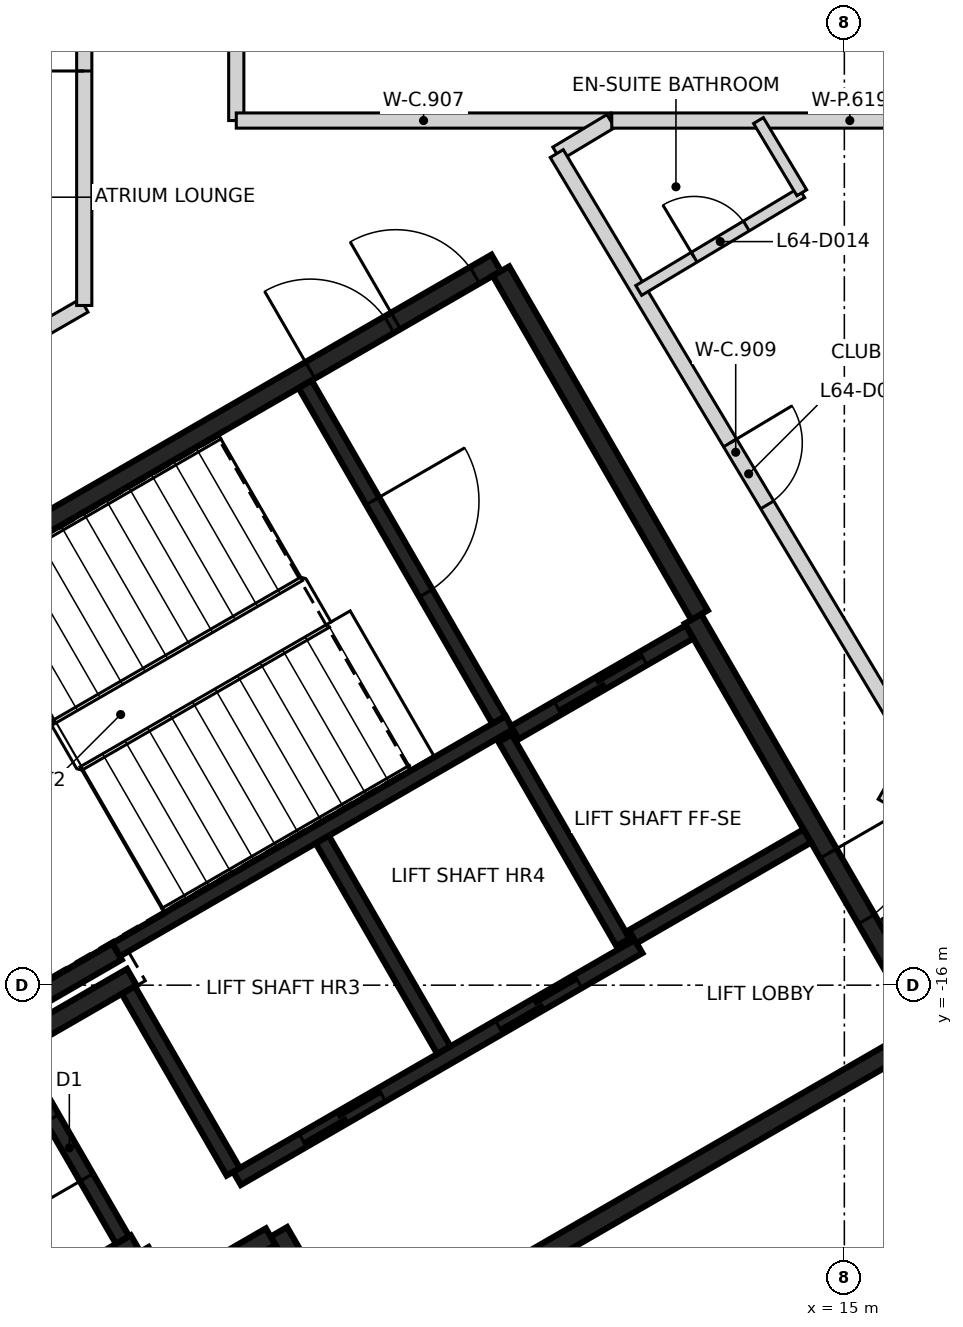
"""IFC4 building model, lengths in metres.
Left out: names, types, materials, properties, quantities, classifications, styles, units other than length and angle.
Written with IfcOpenShell. Run it as: python <this file> out.ifc"""

import sys

from ifc_helpers import new_model, si_unit, direction, frame, frame_2d, origin, place, context, subcontext, project, spatial, rectangle, extrude, element, fill, save


model = new_model("IFC4")
c1 = context("Model", 3, precision=1e-05, world=origin(), true_north=direction((0.0, 1.0)))
c2 = subcontext(c1, "Body", "Model", "MODEL_VIEW")
j1 = project(units=[si_unit("LENGTHUNIT", "METRE"), si_unit("PLANEANGLEUNIT", "RADIAN")], contexts=[c1])
p1 = place(None, origin())
s1 = spatial("IfcSite", under=j1, at=p1, CompositionType="ELEMENT")
p2 = place(p1, origin())
s2 = spatial("IfcBuilding", under=s1, at=p2, CompositionType="ELEMENT")
p3 = place(p2, frame((0.0, 0.0, 253.8)))
s3 = spatial("IfcBuildingStorey", under=s2, at=p3, CompositionType="ELEMENT", Elevation=253.8)
p4 = place(p3, frame((0.417, -12.273, 0.0), z_axis=(0.0, 0.0, 1.0), x_axis=(0.866021906294, 0.500006057782, 0.0)))
e1 = element("IfcWall", 1, at=p4, inside=s3, PredefinedType="SHEAR", context=c2, shape_type="SweptSolid", body=[
    extrude(rectangle(XDim=11.55, YDim=0.25, at=frame_2d((5.775, 0.0))), origin(), (0.0, 0.0, 1.0), 3.2),
])
p5 = place(p4, frame((10.025, 0.0, 0.0)))
e2 = element("IfcOpeningElement", 2, at=p5, cuts=e1, PredefinedType="OPENING", context=c2, shape_type="SweptSolid", body=[
    extrude(rectangle(XDim=1.2, YDim=2.1, at=frame_2d((0.6, 1.05))), frame((0.0, 0.135, 0.0), z_axis=(0.0, -1.0, 0.0), x_axis=(1.0, 0.0, 0.0)), (0.0, 0.0, 1.0), 0.27),
])
p6 = place(p4, frame((8.725, 0.0, 0.0)))
e3 = element("IfcOpeningElement", 3, at=p6, cuts=e1, PredefinedType="OPENING", context=c2, shape_type="SweptSolid", body=[
    extrude(rectangle(XDim=1.2, YDim=2.1, at=frame_2d((0.6, 1.05))), frame((0.0, 0.135, 0.0), z_axis=(0.0, -1.0, 0.0), x_axis=(1.0, 0.0, 0.0)), (0.0, 0.0, 1.0), 0.27),
])
p7 = place(p3, frame((16.133, -16.594, 0.0), z_axis=(0.0, 0.0, 1.0), x_axis=(-0.866022959057, -0.500004234368, 0.0)))
e4 = element("IfcWall", 4, at=p7, inside=s3, PredefinedType="SHEAR", context=c2, shape_type="SweptSolid", body=[
    extrude(rectangle(XDim=8.75, YDim=0.25, at=frame_2d((4.375, 0.0))), origin(), (0.0, 0.0, 1.0), 3.2),
])
p8 = place(p3, frame((13.008, -11.181, 0.0), z_axis=(0.0, 0.0, 1.0), x_axis=(0.500001955336, -0.866024274868, 0.0)))
e5 = element("IfcWall", 5, at=p8, inside=s3, PredefinedType="SHEAR", context=c2, shape_type="SweptSolid", body=[
    extrude(rectangle(XDim=6.125, YDim=0.25, at=frame_2d((3.062, 0.0))), origin(), (0.0, 0.0, 1.0), 3.2),
])
p9 = place(p8, frame((3.563, 0.0, 0.0)))
e6 = element("IfcOpeningElement", 6, at=p9, cuts=e5, PredefinedType="OPENING", context=c2, shape_type="SweptSolid", body=[
    extrude(rectangle(XDim=1.0, YDim=2.1, at=frame_2d((0.5, 1.05))), frame((0.0, 0.135, 0.0), z_axis=(0.0, -1.0, 0.0), x_axis=(1.0, 0.0, 0.0)), (0.0, 0.0, 1.0), 0.27),
])
p10 = place(p3, frame((10.483, -6.606, 0.0), z_axis=(0.0, 0.0, 1.0), x_axis=(0.49999885962, -0.866026062182, 0.0)))
e7 = element("IfcWall", 7, at=p10, inside=s3, PredefinedType="SHEAR", context=c2, shape_type="SweptSolid", body=[
    extrude(rectangle(XDim=5.225, YDim=0.25, at=frame_2d((2.612, 0.0))), origin(), (0.0, 0.0, 1.0), 3.2),
])
p11 = place(p3, frame((5.675, -19.399, 0.0), z_axis=(0.0, 0.0, 1.0), x_axis=(-0.866026637627, -0.499997862916, 0.0)))
e8 = element("IfcWall", 8, at=p11, inside=s3, PredefinedType="SHEAR", context=c2, shape_type="SweptSolid", body=[
    extrude(rectangle(XDim=2.865, YDim=0.25, at=frame_2d((1.432, 0.0))), origin(), (0.0, 0.0, 1.0), 3.2),
])
p12 = place(p3, frame((5.431, -15.556, 0.0), z_axis=(0.0, 0.0, 1.0), x_axis=(-0.866022940537, -0.500004266446, 0.0)))
e9 = element("IfcWall", 9, at=p12, inside=s3, PredefinedType="SHEAR", context=c2, shape_type="SweptSolid", body=[
    extrude(rectangle(XDim=2.575, YDim=0.25, at=frame_2d((1.287, 0.0))), origin(), (0.0, 0.0, 1.0), 3.2),
])
p13 = place(p3, frame((8.493, -20.86, 0.0), z_axis=(0.0, 0.0, 1.0), x_axis=(-0.500039802285, 0.866002422705, 0.0)))
e10 = element("IfcWall", 10, at=p13, inside=s3, PredefinedType="SHEAR", context=c2, shape_type="SweptSolid", body=[
    extrude(rectangle(XDim=1.865, YDim=0.25, at=frame_2d((0.932, 0.0))), origin(), (0.0, 0.0, 1.0), 3.2),
])
p14 = place(p3, frame((4.145, -16.749, 0.0), z_axis=(0.0, 0.0, 1.0), x_axis=(0.866038183914, 0.499977863513, 0.0)))
e11 = element("IfcWall", 11, at=p14, inside=s3, PredefinedType="SHEAR", context=c2, shape_type="SweptSolid", body=[
    extrude(rectangle(XDim=1.71, YDim=0.25, at=frame_2d((0.855, 0.0))), origin(), (0.0, 0.0, 1.0), 3.2),
])
p15 = place(p3, frame((7.452, -19.308, 0.0), z_axis=(0.0, 0.0, 1.0), x_axis=(-0.866044474677, -0.49996696679, 0.0)))
e12 = element("IfcWall", 12, at=p15, inside=s3, PredefinedType="SHEAR", context=c2, shape_type="SweptSolid", body=[
    extrude(rectangle(XDim=1.584, YDim=0.25, at=frame_2d((0.792, 0.0))), origin(), (0.0, 0.0, 1.0), 3.2),
])
p16 = place(p3, frame((6.017, -19.992, 0.0), z_axis=(0.0, 0.0, 1.0), x_axis=(-0.500364886717, 0.865814633822, 0.0)))
e13 = element("IfcWall", 13, at=p16, inside=s3, PredefinedType="SHEAR", context=c2, shape_type="SweptSolid", body=[
    extrude(rectangle(XDim=0.559, YDim=0.25, at=frame_2d((0.28, 0.0))), origin(), (0.0, 0.0, 1.0), 3.2),
])
p17 = place(p3, frame((5.419, -15.534, 0.0), z_axis=(0.0, 0.0, 1.0), x_axis=(0.866029065029, 0.499993658486, 0.0)))
e14 = element("IfcWall", 14, at=p17, inside=s3, PredefinedType="SHEAR", context=c2, shape_type="SweptSolid", body=[
    extrude(rectangle(XDim=5.974, YDim=0.2, at=frame_2d((2.987, 0.0))), origin(), (0.0, 0.0, 1.0), 3.2),
])
p18 = place(p3, frame((7.01, -18.542, 0.0), z_axis=(0.0, 0.0, 1.0), x_axis=(0.866030299012, 0.499991521122, 0.0)))
e15 = element("IfcWall", 15, at=p18, inside=s3, PredefinedType="SHEAR", context=c2, shape_type="SweptSolid", body=[
    extrude(rectangle(XDim=6.1, YDim=0.2, at=frame_2d((3.05, 0.0))), origin(), (0.0, 0.0, 1.0), 3.2),
])
p19 = place(p18, frame((1.0, 0.0, 0.0)))
e16 = element("IfcOpeningElement", 16, at=p19, cuts=e15, PredefinedType="OPENING", context=c2, shape_type="SweptSolid", body=[
    extrude(rectangle(XDim=1.2, YDim=2.1, at=frame_2d((0.6, 1.05))), frame((0.0, 0.11, 0.0), z_axis=(0.0, -1.0, 0.0), x_axis=(1.0, 0.0, 0.0)), (0.0, 0.0, 1.0), 0.22),
])
p20 = place(p18, frame((3.982, 0.0, 0.0)))
e17 = element("IfcOpeningElement", 17, at=p20, cuts=e15, PredefinedType="OPENING", context=c2, shape_type="SweptSolid", body=[
    extrude(rectangle(XDim=1.2, YDim=2.1, at=frame_2d((0.6, 1.05))), frame((0.0, 0.11, 0.0), z_axis=(0.0, -1.0, 0.0), x_axis=(1.0, 0.0, 0.0)), (0.0, 0.0, 1.0), 0.22),
])
p21 = place(p3, frame((7.906, -8.094, 0.0), z_axis=(0.0, 0.0, 1.0), x_axis=(0.500027839223, -0.866009330205, 0.0)))
e18 = element("IfcWall", 18, at=p21, inside=s3, PredefinedType="SHEAR", context=c2, shape_type="SweptSolid", body=[
    extrude(rectangle(XDim=5.098, YDim=0.2, at=frame_2d((2.549, 0.0))), origin(), (0.0, 0.0, 1.0), 3.2),
])
p22 = place(p21, frame((1.774, 0.0, 0.0)))
e19 = element("IfcOpeningElement", 19, at=p22, cuts=e18, PredefinedType="OPENING", context=c2, shape_type="SweptSolid", body=[
    extrude(rectangle(XDim=1.4, YDim=2.1, at=frame_2d((0.7, 1.05))), frame((0.0, 0.11, 0.0), z_axis=(0.0, -1.0, 0.0), x_axis=(1.0, 0.0, 0.0)), (0.0, 0.0, 1.0), 0.22),
])
p23 = place(p3, frame((8.132, -14.084, 0.0), z_axis=(0.0, 0.0, 1.0), x_axis=(0.499997778408, -0.866026686418, 0.0)))
e20 = element("IfcWall", 20, at=p23, inside=s3, PredefinedType="SHEAR", context=c2, shape_type="SweptSolid", body=[
    extrude(rectangle(XDim=3.198, YDim=0.2, at=frame_2d((1.599, 0.0))), origin(), (0.0, 0.0, 1.0), 3.2),
])
p24 = place(p3, frame((5.503, -19.352, 0.0), z_axis=(0.0, 0.0, 1.0), x_axis=(-0.499986818241, 0.866033014143, 0.0)))
e21 = element("IfcWall", 21, at=p24, inside=s3, PredefinedType="SHEAR", context=c2, shape_type="SweptSolid", body=[
    extrude(rectangle(XDim=2.798, YDim=0.2, at=frame_2d((1.399, 0.0))), origin(), (0.0, 0.0, 1.0), 3.2),
])
p25 = place(p24, frame((0.949, 0.0, 0.0)))
e22 = element("IfcOpeningElement", 22, at=p25, cuts=e21, PredefinedType="OPENING", context=c2, shape_type="SweptSolid", body=[
    extrude(rectangle(XDim=0.9, YDim=2.1, at=frame_2d((0.45, 1.05))), frame((0.0, 0.11, 0.0), z_axis=(0.0, -1.0, 0.0), x_axis=(1.0, 0.0, 0.0)), (0.0, 0.0, 1.0), 0.22),
])
p26 = place(p3, frame((6.96, -18.455, 0.0), z_axis=(0.0, 0.0, 1.0), x_axis=(-0.499926705758, 0.866067716099, 0.0)))
e23 = element("IfcWall", 23, at=p26, inside=s3, PredefinedType="SHEAR", context=c2, shape_type="SweptSolid", body=[
    extrude(rectangle(XDim=2.759, YDim=0.2, at=frame_2d((1.38, 0.0))), origin(), (0.0, 0.0, 1.0), 3.2),
])
p27 = place(p3, frame((12.088, -15.437, 0.0), z_axis=(0.0, 0.0, 1.0), x_axis=(-0.500026960575, 0.86600983753, 0.0)))
e24 = element("IfcWall", 24, at=p27, inside=s3, PredefinedType="SHEAR", context=c2, shape_type="SweptSolid", body=[
    extrude(rectangle(XDim=3.1, YDim=0.2, at=frame_2d((1.55, 0.0))), origin(), (0.0, 0.0, 1.0), 3.2),
])
p28 = place(p3, frame((10.666, -12.678, 0.0), z_axis=(0.0, 0.0, 1.0), x_axis=(0.866018407898, 0.500012117035, 0.0)))
e25 = element("IfcWall", 25, at=p28, inside=s3, PredefinedType="SHEAR", context=c2, shape_type="SweptSolid", body=[
    extrude(rectangle(XDim=2.651, YDim=0.2, at=frame_2d((1.325, 0.0))), origin(), (0.0, 0.0, 1.0), 3.2),
])
p29 = place(p28, frame((0.652, 0.0, 0.0)))
e26 = element("IfcOpeningElement", 26, at=p29, cuts=e25, PredefinedType="OPENING", context=c2, shape_type="SweptSolid", body=[
    extrude(rectangle(XDim=1.3, YDim=2.1, at=frame_2d((0.65, 1.05))), frame((0.0, 0.11, 0.0), z_axis=(0.0, -1.0, 0.0), x_axis=(1.0, 0.0, 0.0)), (0.0, 0.0, 1.0), 0.22),
])
p30 = place(p3, frame((14.512, -14.037, 0.0), z_axis=(0.0, 0.0, 1.0), x_axis=(-0.866018407898, -0.500012117035, 0.0)))
e27 = element("IfcWall", 27, at=p30, inside=s3, PredefinedType="SHEAR", context=c2, shape_type="SweptSolid", body=[
    extrude(rectangle(XDim=2.651, YDim=0.2, at=frame_2d((1.325, 0.0))), origin(), (0.0, 0.0, 1.0), 3.2),
])
p31 = place(p3, frame((3.612, -7.859, 0.0), z_axis=(0.0, 0.0, 1.0), x_axis=(0.866002901518, 0.500038973044, 0.0)))
e28 = element("IfcWall", 28, at=p31, inside=s3, PredefinedType="PARTITIONING", context=c2, shape_type="SweptSolid", body=[
    extrude(rectangle(XDim=1.602, YDim=0.2, at=frame_2d((0.801, 0.0))), origin(), (0.0, 0.0, 1.0), 3.2),
])
p32 = place(p3, frame((5.0, -7.058, 0.0), z_axis=(0.0, 0.0, 1.0), x_axis=(0.0, 1.0, 0.0)))
e29 = element("IfcWall", 29, at=p32, inside=s3, PredefinedType="PARTITIONING", context=c2, shape_type="SweptSolid", body=[
    extrude(rectangle(XDim=14.116, YDim=0.2, at=frame_2d((7.058, 0.0))), origin(), (0.0, 0.0, 1.0), 3.2),
])
p33 = place(p32, frame((3.085, 0.0, 0.0)))
e30 = element("IfcOpeningElement", 30, at=p33, cuts=e29, PredefinedType="OPENING", context=c2, shape_type="SweptSolid", body=[
    extrude(rectangle(XDim=0.9, YDim=2.1, at=frame_2d((0.45, 1.05))), frame((0.0, 0.11, 0.0), z_axis=(0.0, -1.0, 0.0), x_axis=(1.0, 0.0, 0.0)), (0.0, 0.0, 1.0), 0.22),
])
p34 = place(p32, frame((10.131, 0.0, 0.0)))
e31 = element("IfcOpeningElement", 31, at=p34, cuts=e29, PredefinedType="OPENING", context=c2, shape_type="SweptSolid", body=[
    extrude(rectangle(XDim=0.9, YDim=2.1, at=frame_2d((0.45, 1.05))), frame((0.0, 0.11, 0.0), z_axis=(0.0, -1.0, 0.0), x_axis=(1.0, 0.0, 0.0)), (0.0, 0.0, 1.0), 0.22),
])
p35 = place(p3, frame((7.0, -4.625, 0.0), z_axis=(0.0, 0.0, 1.0), x_axis=(0.0, 1.0, 0.0)))
e32 = element("IfcWall", 32, at=p35, inside=s3, PredefinedType="PARTITIONING", context=c2, shape_type="SweptSolid", body=[
    extrude(rectangle(XDim=12.884, YDim=0.2, at=frame_2d((6.442, 0.0))), origin(), (0.0, 0.0, 1.0), 3.2),
])
p36 = place(p35, frame((3.931, 0.0, 0.0)))
e33 = element("IfcOpeningElement", 33, at=p36, cuts=e32, PredefinedType="OPENING", context=c2, shape_type="SweptSolid", body=[
    extrude(rectangle(XDim=1.4, YDim=2.1, at=frame_2d((0.7, 1.05))), frame((0.0, 0.11, 0.0), z_axis=(0.0, -1.0, 0.0), x_axis=(1.0, 0.0, 0.0)), (0.0, 0.0, 1.0), 0.22),
])
p37 = place(p35, frame((11.777, 0.0, 0.0)))
e34 = element("IfcOpeningElement", 34, at=p37, cuts=e32, PredefinedType="OPENING", context=c2, shape_type="SweptSolid", body=[
    extrude(rectangle(XDim=0.95, YDim=2.1, at=frame_2d((0.475, 1.05))), frame((0.0, 0.11, 0.0), z_axis=(0.0, -1.0, 0.0), x_axis=(1.0, 0.0, 0.0)), (0.0, 0.0, 1.0), 0.22),
])
p38 = place(p3, frame((7.0, -4.625, 0.0), z_axis=(0.0, 0.0, 1.0), x_axis=(1.0, 0.0, 0.0)))
e35 = element("IfcWall", 35, at=p38, inside=s3, PredefinedType="PARTITIONING", context=c2, shape_type="SweptSolid", body=[
    extrude(rectangle(XDim=4.928, YDim=0.2, at=frame_2d((2.464, 0.0))), origin(), (0.0, 0.0, 1.0), 3.2),
])
p39 = place(p3, frame((11.216, -5.06, 0.0), z_axis=(0.0, 0.0, 1.0), x_axis=(0.857051740658, 0.515230350265, 0.0)))
e36 = element("IfcWall", 36, at=p39, inside=s3, PredefinedType="PARTITIONING", context=c2, shape_type="SweptSolid", body=[
    extrude(rectangle(XDim=0.831, YDim=0.2, at=frame_2d((0.415, 0.0))), origin(), (0.0, 0.0, 1.0), 3.2),
])
p40 = place(p3, frame((11.216, -5.06, 0.0), z_axis=(0.0, 0.0, 1.0), x_axis=(0.514001858113, -0.857789070726, 0.0)))
e37 = element("IfcWall", 37, at=p40, inside=s3, PredefinedType="PARTITIONING", context=c2, shape_type="SweptSolid", body=[
    extrude(rectangle(XDim=9.161, YDim=0.2, at=frame_2d((4.581, 0.0))), origin(), (0.0, 0.0, 1.0), 3.2),
])
p41 = place(p40, frame((4.437, 0.0, 0.0)))
e38 = element("IfcOpeningElement", 38, at=p41, cuts=e37, PredefinedType="OPENING", context=c2, shape_type="SweptSolid", body=[
    extrude(rectangle(XDim=0.95, YDim=2.1, at=frame_2d((0.475, 1.05))), frame((0.0, 0.11, 0.0), z_axis=(0.0, -1.0, 0.0), x_axis=(1.0, 0.0, 0.0)), (0.0, 0.0, 1.0), 0.22),
])
p42 = place(p3, frame((15.55, -15.213, 0.0), z_axis=(0.0, 0.0, 1.0), x_axis=(0.865989998118, 0.500061319399, 0.0)))
e39 = element("IfcWall", 39, at=p42, inside=s3, PredefinedType="PARTITIONING", context=c2, shape_type="SweptSolid", body=[
    extrude(rectangle(XDim=0.79, YDim=0.2, at=frame_2d((0.395, 0.0))), origin(), (0.0, 0.0, 1.0), 3.2),
])
p43 = place(p3, frame((15.532, -13.603, 0.0), z_axis=(0.0, 0.0, 1.0), x_axis=(0.498203662485, 0.867060038686, 0.0)))
e40 = element("IfcWall", 40, at=p43, inside=s3, PredefinedType="PARTITIONING", context=c2, shape_type="SweptSolid", body=[
    extrude(rectangle(XDim=0.789, YDim=0.2, at=frame_2d((0.395, 0.0))), origin(), (0.0, 0.0, 1.0), 3.2),
])
p44 = place(p3, frame((11.94, -4.625, 0.0), z_axis=(0.0, 0.0, 1.0), x_axis=(1.0, 0.0, 0.0)))
e41 = element("IfcWall", 41, at=p44, inside=s3, PredefinedType="PARTITIONING", context=c2, shape_type="SweptSolid", body=[
    extrude(rectangle(XDim=6.264, YDim=0.2, at=frame_2d((3.132, 0.0))), origin(), (0.0, 0.0, 1.0), 3.2),
])
p45 = place(p3, frame((12.295, -6.86, 0.0), z_axis=(0.0, 0.0, 1.0), x_axis=(0.857820116165, 0.513950044559, 0.0)))
e42 = element("IfcWall", 42, at=p45, inside=s3, PredefinedType="PARTITIONING", context=c2, shape_type="SweptSolid", body=[
    extrude(rectangle(XDim=2.5, YDim=0.15, at=frame_2d((1.25, 0.0))), origin(), (0.0, 0.0, 1.0), 3.2),
])
p46 = place(p45, frame((0.85, 0.0, 0.0)))
e43 = element("IfcOpeningElement", 43, at=p46, cuts=e42, PredefinedType="OPENING", context=c2, shape_type="SweptSolid", body=[
    extrude(rectangle(XDim=0.8, YDim=2.1, at=frame_2d((0.4, 1.05))), frame((0.0, 0.085, 0.0), z_axis=(0.0, -1.0, 0.0), x_axis=(1.0, 0.0, 0.0)), (0.0, 0.0, 1.0), 0.17),
])
p47 = place(p3, frame((13.87, -4.625, 0.0), z_axis=(0.0, 0.0, 1.0), x_axis=(0.514398519676, -0.857551259666, 0.0)))
e44 = element("IfcWall", 44, at=p47, inside=s3, PredefinedType="PARTITIONING", context=c2, shape_type="SweptSolid", body=[
    extrude(rectangle(XDim=1.108, YDim=0.15, at=frame_2d((0.554, 0.0))), origin(), (0.0, 0.0, 1.0), 3.2),
])
p48 = place(p29, origin())
e45 = element("IfcDoor", 45, at=p48, inside=s3, OperationType="SLIDING_TO_RIGHT", PredefinedType="DOOR", context=c2, shape_type="SweptSolid", body=[
    extrude(rectangle(XDim=1.3, YDim=2.1, at=frame_2d((0.65, 1.05))), frame((0.0, 0.025, 0.0), z_axis=(0.0, -1.0, 0.0), x_axis=(1.0, 0.0, 0.0)), (0.0, 0.0, 1.0), 0.05),
])
fill(e26, e45)
p49 = place(p19, origin())
e46 = element("IfcDoor", 46, at=p49, inside=s3, OperationType="DOUBLE_DOOR_SLIDING", PredefinedType="DOOR", context=c2, shape_type="SweptSolid", body=[
    extrude(rectangle(XDim=1.2, YDim=2.1, at=frame_2d((0.6, 1.05))), frame((0.0, 0.025, 0.0), z_axis=(0.0, -1.0, 0.0), x_axis=(1.0, 0.0, 0.0)), (0.0, 0.0, 1.0), 0.05),
])
fill(e16, e46)
p50 = place(p20, origin())
e47 = element("IfcDoor", 47, at=p50, inside=s3, OperationType="DOUBLE_DOOR_SLIDING", PredefinedType="DOOR", context=c2, shape_type="SweptSolid", body=[
    extrude(rectangle(XDim=1.2, YDim=2.1, at=frame_2d((0.6, 1.05))), frame((0.0, 0.025, 0.0), z_axis=(0.0, -1.0, 0.0), x_axis=(1.0, 0.0, 0.0)), (0.0, 0.0, 1.0), 0.05),
])
fill(e17, e47)
p51 = place(p9, origin())
e48 = element("IfcDoor", 48, at=p51, inside=s3, OperationType="SINGLE_SWING_LEFT", PredefinedType="DOOR", context=c2, shape_type="SweptSolid", body=[
    extrude(rectangle(XDim=1.0, YDim=2.1, at=frame_2d((0.5, 1.05))), frame((0.0, 0.025, 0.0), z_axis=(0.0, -1.0, 0.0), x_axis=(1.0, 0.0, 0.0)), (0.0, 0.0, 1.0), 0.05),
])
fill(e6, e48)
p52 = place(p5, origin())
e49 = element("IfcDoor", 49, at=p52, inside=s3, OperationType="SINGLE_SWING_LEFT", PredefinedType="DOOR", context=c2, shape_type="SweptSolid", body=[
    extrude(rectangle(XDim=1.2, YDim=2.1, at=frame_2d((0.6, 1.05))), frame((0.0, 0.025, 0.0), z_axis=(0.0, -1.0, 0.0), x_axis=(1.0, 0.0, 0.0)), (0.0, 0.0, 1.0), 0.05),
])
fill(e2, e49)
p53 = place(p6, origin())
e50 = element("IfcDoor", 50, at=p53, inside=s3, OperationType="SINGLE_SWING_RIGHT", PredefinedType="DOOR", context=c2, shape_type="SweptSolid", body=[
    extrude(rectangle(XDim=1.2, YDim=2.1, at=frame_2d((0.6, 1.05))), frame((0.0, 0.025, 0.0), z_axis=(0.0, -1.0, 0.0), x_axis=(1.0, 0.0, 0.0)), (0.0, 0.0, 1.0), 0.05),
])
fill(e3, e50)
p54 = place(p22, origin())
e51 = element("IfcDoor", 51, at=p54, inside=s3, OperationType="SINGLE_SWING_RIGHT", PredefinedType="DOOR", context=c2, shape_type="SweptSolid", body=[
    extrude(rectangle(XDim=1.4, YDim=2.1, at=frame_2d((0.7, 1.05))), frame((0.0, 0.025, 0.0), z_axis=(0.0, -1.0, 0.0), x_axis=(1.0, 0.0, 0.0)), (0.0, 0.0, 1.0), 0.05),
])
fill(e19, e51)
p55 = place(p25, origin())
e52 = element("IfcDoor", 52, at=p55, inside=s3, OperationType="SINGLE_SWING_LEFT", PredefinedType="DOOR", context=c2, shape_type="SweptSolid", body=[
    extrude(rectangle(XDim=0.9, YDim=2.1, at=frame_2d((0.45, 1.05))), frame((0.0, 0.025, 0.0), z_axis=(0.0, -1.0, 0.0), x_axis=(1.0, 0.0, 0.0)), (0.0, 0.0, 1.0), 0.05),
])
fill(e22, e52)
p56 = place(p41, origin())
e53 = element("IfcDoor", 53, at=p56, inside=s3, OperationType="SINGLE_SWING_LEFT", PredefinedType="DOOR", context=c2, shape_type="SweptSolid", body=[
    extrude(rectangle(XDim=0.95, YDim=2.1, at=frame_2d((0.475, 1.05))), frame((0.0, 0.025, 0.0), z_axis=(0.0, -1.0, 0.0), x_axis=(1.0, 0.0, 0.0)), (0.0, 0.0, 1.0), 0.05),
])
fill(e38, e53)
p57 = place(p46, frame((0.8, 0.0, 0.0), z_axis=(0.0, 0.0, 1.0), x_axis=(-1.0, 0.0, 0.0)))
e54 = element("IfcDoor", 54, at=p57, inside=s3, OperationType="SINGLE_SWING_LEFT", PredefinedType="DOOR", context=c2, shape_type="SweptSolid", body=[
    extrude(rectangle(XDim=0.8, YDim=2.1, at=frame_2d((0.4, 1.05))), frame((0.0, 0.025, 0.0), z_axis=(0.0, -1.0, 0.0), x_axis=(1.0, 0.0, 0.0)), (0.0, 0.0, 1.0), 0.05),
])
fill(e43, e54)
p58 = place(p33, origin())
e55 = element("IfcDoor", 55, at=p58, inside=s3, OperationType="SINGLE_SWING_LEFT", PredefinedType="DOOR", context=c2, shape_type="SweptSolid", body=[
    extrude(rectangle(XDim=0.9, YDim=2.1, at=frame_2d((0.45, 1.05))), frame((0.0, 0.025, 0.0), z_axis=(0.0, -1.0, 0.0), x_axis=(1.0, 0.0, 0.0)), (0.0, 0.0, 1.0), 0.05),
])
fill(e30, e55)
save(model, sys.argv[1])
